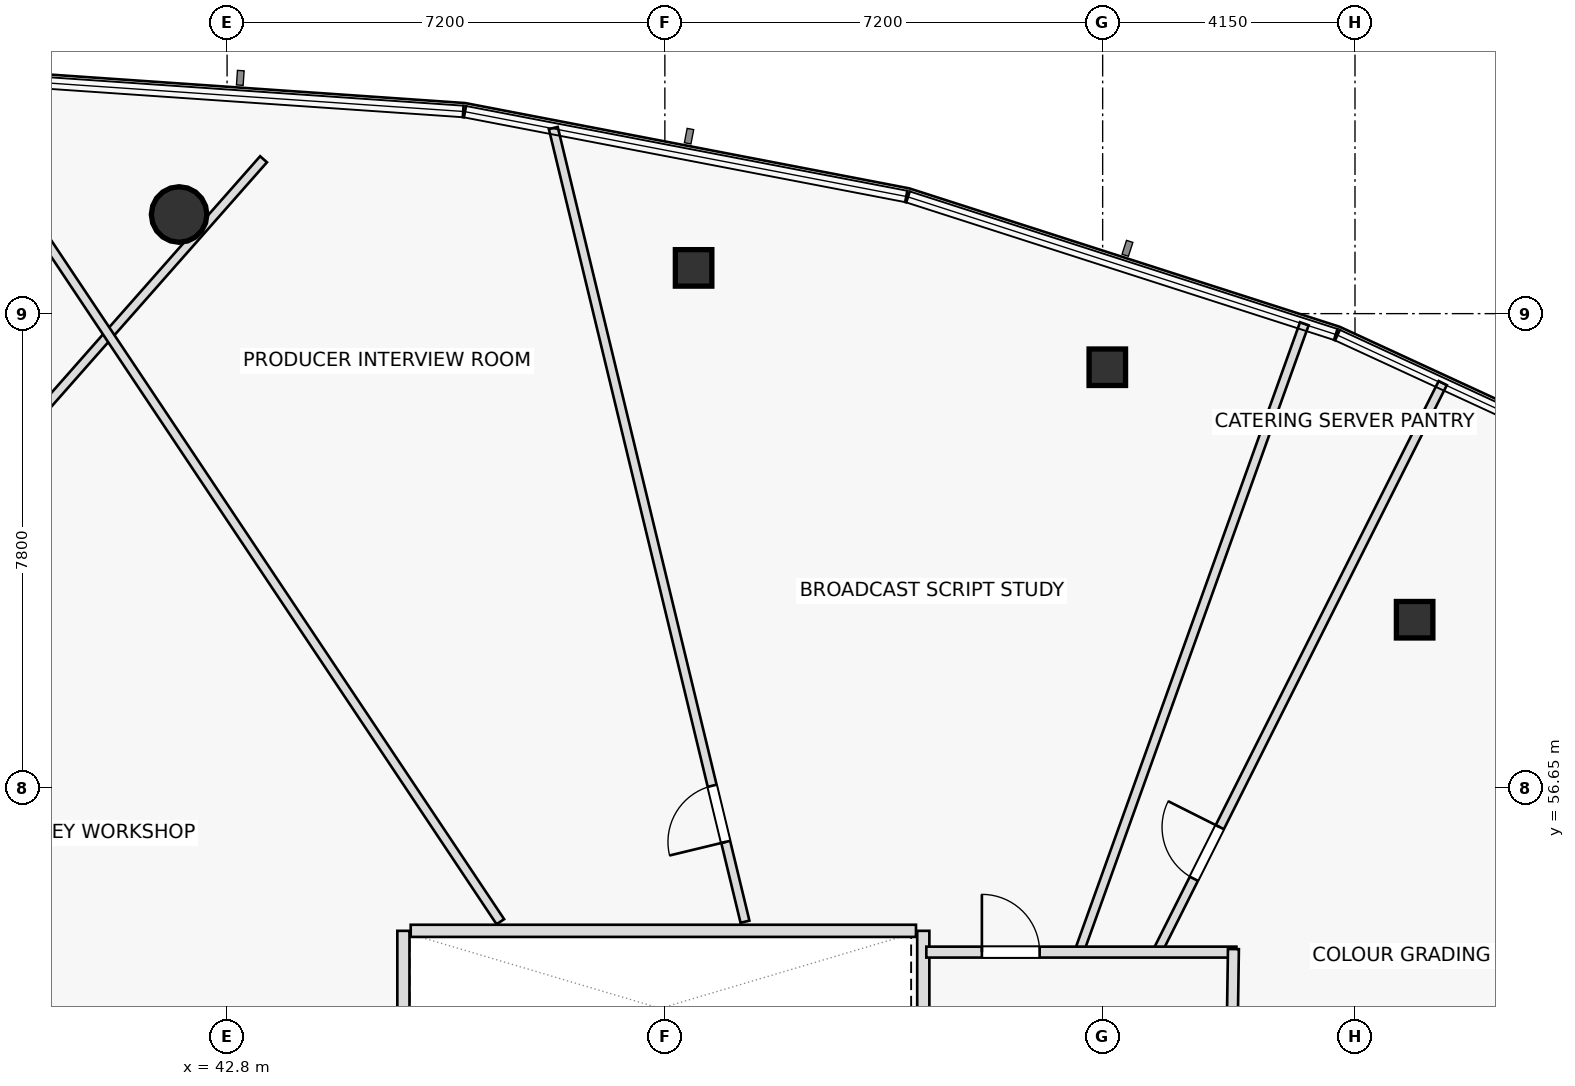
"""IFC4 building model, lengths in metres.
Left out: names, types, materials, properties, quantities, classifications, styles, units other than length and angle.
Written with IfcOpenShell. Run it as: python <this file> out.ifc"""

import sys

from ifc_helpers import new_model, si_unit, direction, frame, frame_2d, origin, origin_2d, place, context, subcontext, project, spatial, rectangle, hollow_rectangle, hollow_circle, extrude, element, fill, save


model = new_model("IFC4")
c1 = context("Model", 3, precision=1e-05, world=origin(), true_north=direction((0.0, 1.0)))
c2 = subcontext(c1, "Body", "Model", "MODEL_VIEW")
j1 = project(units=[si_unit("LENGTHUNIT", "METRE"), si_unit("PLANEANGLEUNIT", "RADIAN")], contexts=[c1])
p1 = place(None, origin())
s1 = spatial("IfcSite", under=j1, at=p1, CompositionType="ELEMENT")
p2 = place(p1, origin())
s2 = spatial("IfcBuilding", under=s1, at=p2, CompositionType="ELEMENT")
p3 = place(p2, frame((0.0, 0.0, 196.45)))
s3 = spatial("IfcBuildingStorey", under=s2, at=p3, CompositionType="ELEMENT", Elevation=196.45)
p4 = place(p3, frame((42.011, 66.08, 0.0), z_axis=(0.0, 0.0, 1.0), x_axis=(1.0, 0.0, 0.0)))
e1 = element("IfcColumn", 1, at=p4, inside=s3, PredefinedType="COLUMN", context=c2, shape_type="SweptSolid", body=[
    extrude(hollow_circle(Radius=0.457, WallThickness=0.04, at=origin_2d()), origin(), (0.0, 0.0, 1.0), 3.55),
])
for number, where, z_axis, x_axis in (
    (2, (62.331, 59.416, 0.0), (0.0, 0.0, 1.0), (1.0, 0.0, 0.0)),
    (3, (57.277, 63.568, 0.0), (0.0, 0.0, 1.0), (1.0, 0.0, 0.0)),
    (4, (50.472, 65.202, 0.0), (0.0, 0.0, 1.0), (1.0, 0.0, 0.0)),
):
    element("IfcColumn", number, at=place(p3, frame(where, z_axis=z_axis, x_axis=x_axis)), inside=s3, PredefinedType="COLUMN", context=c2, shape_type="SweptSolid", body=[
        extrude(hollow_rectangle(XDim=0.6, YDim=0.6, WallThickness=0.036, at=origin_2d()), origin(), (0.0, 0.0, 1.0), 3.55),
    ])
for number, where, z_axis, x_axis in (
    (5, (45.7, 51.7, 0.0), (0.0, 0.0, 1.0), (0.0, 1.0, 0.0)),
    (6, (54.25, 51.7, 0.0), (0.0, 0.0, 1.0), (0.0, 1.0, 0.0)),
):
    element("IfcWall", number, at=place(p3, frame(where, z_axis=z_axis, x_axis=x_axis)), inside=s3, PredefinedType="PARTITIONING", context=c2, shape_type="SweptSolid", body=[
        extrude(rectangle(XDim=2.6, YDim=0.2, at=frame_2d((1.3, 0.0))), origin(), (0.0, 0.0, 1.0), 3.55),
    ])
p5 = place(p3, frame((43.4, 66.989, 0.0), z_axis=(0.0, 0.0, 1.0), x_axis=(-0.661622343701, -0.749837231881, 0.0)))
e7 = element("IfcWall", 7, at=p5, inside=s3, PredefinedType="PARTITIONING", context=c2, shape_type="SweptSolid", body=[
    extrude(rectangle(XDim=11.427, YDim=0.15, at=frame_2d((5.714, 0.0))), origin(), (0.0, 0.0, 1.0), 2.935),
])
p6 = place(p3, frame((59.563, 48.25, 0.0), z_axis=(0.0, 0.0, 1.0), x_axis=(0.878046175679, 0.478575922269, 0.0)))
e8 = element("IfcWall", 8, at=p6, inside=s3, PredefinedType="PARTITIONING", context=c2, shape_type="SweptSolid", body=[
    extrude(rectangle(XDim=17.342, YDim=0.15, at=frame_2d((8.671, 0.0))), origin(), (0.0, 0.0, 1.0), 2.935),
])
p7 = place(p6, frame((1.35, 0.0, 0.0)))
e9 = element("IfcOpeningElement", 9, at=p7, cuts=e8, PredefinedType="OPENING", context=c2, shape_type="SweptSolid", body=[
    extrude(rectangle(XDim=0.95, YDim=2.05, at=frame_2d((0.475, 1.025))), frame((0.0, 0.085, 0.0), z_axis=(0.0, -1.0, 0.0), x_axis=(1.0, 0.0, 0.0)), (0.0, 0.0, 1.0), 0.17),
])
p8 = place(p3, frame((58.094, 53.95, 0.0), z_axis=(0.0, 0.0, 1.0), x_axis=(0.448770289667, 0.89364714911, 0.0)))
e10 = element("IfcWall", 10, at=p8, inside=s3, PredefinedType="PARTITIONING", context=c2, shape_type="SweptSolid", body=[
    extrude(rectangle(XDim=10.472, YDim=0.15, at=frame_2d((5.236, 0.0))), origin(), (0.0, 0.0, 1.0), 3.025),
])
p9 = place(p8, frame((1.35, 0.0, 0.0)))
e11 = element("IfcOpeningElement", 11, at=p9, cuts=e10, PredefinedType="OPENING", context=c2, shape_type="SweptSolid", body=[
    extrude(rectangle(XDim=0.95, YDim=2.05, at=frame_2d((0.475, 1.025))), frame((0.0, 0.085, 0.0), z_axis=(0.0, -1.0, 0.0), x_axis=(1.0, 0.0, 0.0)), (0.0, 0.0, 1.0), 0.17),
])
p10 = place(p3, frame((56.81, 53.95, 0.0), z_axis=(0.0, 0.0, 1.0), x_axis=(0.337634919484, 0.941277143643, 0.0)))
e12 = element("IfcWall", 12, at=p10, inside=s3, PredefinedType="PARTITIONING", context=c2, shape_type="SweptSolid", body=[
    extrude(rectangle(XDim=10.979, YDim=0.15, at=frame_2d((5.489, 0.0))), origin(), (0.0, 0.0, 1.0), 2.935),
])
p11 = place(p3, frame((51.318, 54.45, 0.0), z_axis=(0.0, 0.0, 1.0), x_axis=(-0.2347844954, 0.972047447772, 0.0)))
e13 = element("IfcWall", 13, at=p11, inside=s3, PredefinedType="PARTITIONING", context=c2, shape_type="SweptSolid", body=[
    extrude(rectangle(XDim=13.427, YDim=0.15, at=frame_2d((6.714, 0.0))), origin(), (0.0, 0.0, 1.0), 3.025),
])
p12 = place(p11, frame((1.35, 0.0, 0.0)))
e14 = element("IfcOpeningElement", 14, at=p12, cuts=e13, PredefinedType="OPENING", context=c2, shape_type="SweptSolid", body=[
    extrude(rectangle(XDim=0.95, YDim=2.05, at=frame_2d((0.475, 1.025))), frame((0.0, 0.085, 0.0), z_axis=(0.0, -1.0, 0.0), x_axis=(1.0, 0.0, 0.0)), (0.0, 0.0, 1.0), 0.17),
])
p13 = place(p3, frame((47.294, 54.45, 0.0), z_axis=(0.0, 0.0, 1.0), x_axis=(-0.555036493419, 0.831825998015, 0.0)))
e15 = element("IfcWall", 15, at=p13, inside=s3, PredefinedType="PARTITIONING", context=c2, shape_type="SweptSolid", body=[
    extrude(rectangle(XDim=16.583, YDim=0.15, at=frame_2d((8.292, 0.0))), origin(), (0.0, 0.0, 1.0), 2.935),
])
p14 = place(p3, frame((54.3, 53.95, 0.0), z_axis=(0.0, 0.0, 1.0), x_axis=(1.0, 0.0, 0.0)))
e16 = element("IfcWall", 16, at=p14, inside=s3, PredefinedType="PARTITIONING", context=c2, shape_type="SweptSolid", body=[
    extrude(rectangle(XDim=5.1, YDim=0.18, at=frame_2d((2.55, 0.0))), origin(), (0.0, 0.0, 1.0), 2.935),
])
p15 = place(p14, frame((0.914, 0.0, 0.0)))
e17 = element("IfcOpeningElement", 17, at=p15, cuts=e16, PredefinedType="OPENING", context=c2, shape_type="SweptSolid", body=[
    extrude(rectangle(XDim=0.95, YDim=2.05, at=frame_2d((0.475, 1.025))), frame((0.0, 0.1, 0.0), z_axis=(0.0, -1.0, 0.0), x_axis=(1.0, 0.0, 0.0)), (0.0, 0.0, 1.0), 0.2),
])
p16 = place(p3, frame((59.351, 54.0, 0.0), z_axis=(0.0, 0.0, 1.0), x_axis=(-0.014903899768, -0.999888930718, 0.0)))
e18 = element("IfcWall", 18, at=p16, inside=s3, PredefinedType="PARTITIONING", context=c2, shape_type="SweptSolid", body=[
    extrude(rectangle(XDim=5.701, YDim=0.18, at=frame_2d((2.85, 0.0))), origin(), (0.0, 0.0, 1.0), 2.935),
])
p17 = place(p16, frame((2.375, 0.0, 0.0)))
e19 = element("IfcOpeningElement", 19, at=p17, cuts=e18, PredefinedType="OPENING", context=c2, shape_type="SweptSolid", body=[
    extrude(rectangle(XDim=0.95, YDim=2.05, at=frame_2d((0.475, 1.025))), frame((0.0, 0.1, 0.0), z_axis=(0.0, -1.0, 0.0), x_axis=(1.0, 0.0, 0.0)), (0.0, 0.0, 1.0), 0.2),
])
p18 = place(p3, frame((45.82, 54.3, 0.0), z_axis=(0.0, 0.0, 1.0), x_axis=(1.0, 0.0, 0.0)))
e20 = element("IfcWall", 20, at=p18, inside=s3, PredefinedType="PARTITIONING", context=c2, shape_type="SweptSolid", body=[
    extrude(rectangle(XDim=8.31, YDim=0.2, at=frame_2d((4.155, 0.0))), origin(), (0.0, 0.0, 1.0), 3.55),
])
p19 = place(p9, origin())
e21 = element("IfcDoor", 21, at=p19, inside=s3, OperationType="SINGLE_SWING_RIGHT", PredefinedType="DOOR", context=c2, shape_type="SweptSolid", body=[
    extrude(rectangle(XDim=0.95, YDim=2.05, at=frame_2d((0.475, 1.025))), frame((0.0, 0.025, 0.0), z_axis=(0.0, -1.0, 0.0), x_axis=(1.0, 0.0, 0.0)), (0.0, 0.0, 1.0), 0.05),
])
fill(e11, e21)
p20 = place(p12, origin())
e22 = element("IfcDoor", 22, at=p20, inside=s3, OperationType="SINGLE_SWING_LEFT", PredefinedType="DOOR", context=c2, shape_type="SweptSolid", body=[
    extrude(rectangle(XDim=0.95, YDim=2.05, at=frame_2d((0.475, 1.025))), frame((0.0, 0.025, 0.0), z_axis=(0.0, -1.0, 0.0), x_axis=(1.0, 0.0, 0.0)), (0.0, 0.0, 1.0), 0.05),
])
fill(e14, e22)
p21 = place(p15, origin())
e23 = element("IfcDoor", 23, at=p21, inside=s3, OperationType="SINGLE_SWING_LEFT", PredefinedType="DOOR", context=c2, shape_type="SweptSolid", body=[
    extrude(rectangle(XDim=0.95, YDim=2.05, at=frame_2d((0.475, 1.025))), frame((0.0, 0.025, 0.0), z_axis=(0.0, -1.0, 0.0), x_axis=(1.0, 0.0, 0.0)), (0.0, 0.0, 1.0), 0.05),
])
fill(e17, e23)
save(model, sys.argv[1])
